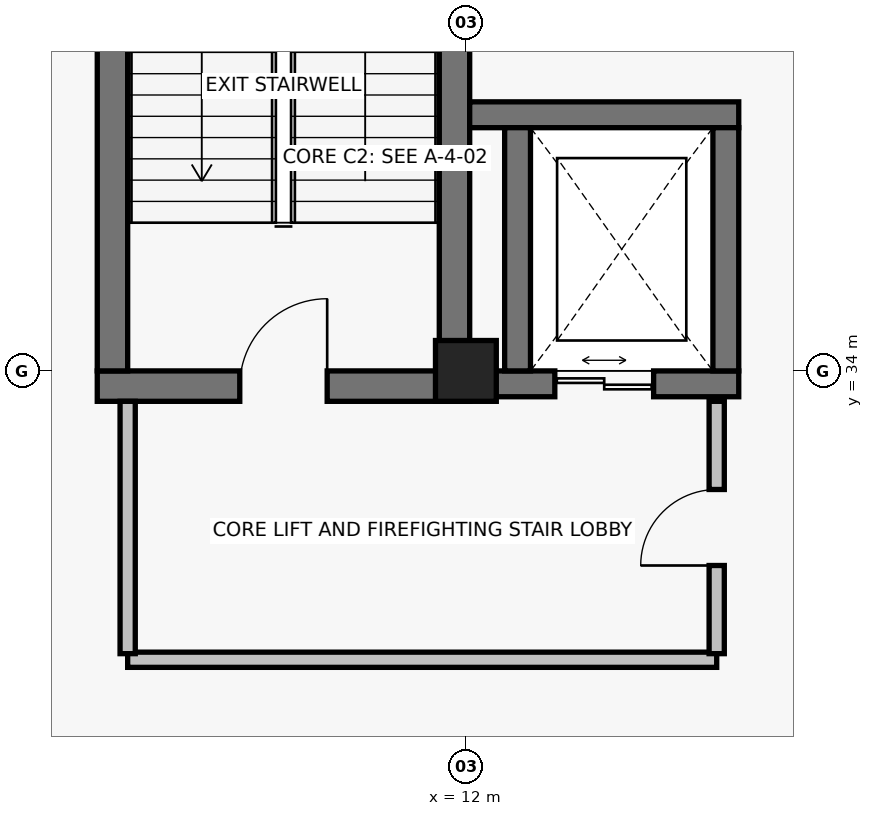
"""IFC4 building model, lengths in metres.
Left out: names, types, materials, properties, quantities, classifications, styles, units other than length and angle.
Written with IfcOpenShell. Run it as: python <this file> out.ifc"""

import sys

from ifc_helpers import new_model, si_unit, direction, frame, frame_2d, origin, origin_2d, place, context, subcontext, project, spatial, rectangle, extrude, element, fill, save


model = new_model("IFC4")
c1 = context("Model", 3, precision=1e-05, world=origin(), true_north=direction((0.0, 1.0)))
c2 = subcontext(c1, "Body", "Model", "MODEL_VIEW")
j1 = project(units=[si_unit("LENGTHUNIT", "METRE"), si_unit("PLANEANGLEUNIT", "RADIAN")], contexts=[c1])
p1 = place(None, origin())
s1 = spatial("IfcSite", under=j1, at=p1, CompositionType="ELEMENT")
p2 = place(p1, origin())
s2 = spatial("IfcBuilding", under=s1, at=p2, CompositionType="ELEMENT")
p3 = place(p2, frame((0.0, 0.0, -4.8)))
s3 = spatial("IfcBuildingStorey", under=s2, at=p3, CompositionType="ELEMENT", Elevation=-4.8)
p4 = place(p3, frame((12.0, 34.0, 0.0), z_axis=(0.0, 0.0, 1.0), x_axis=(1.0, 0.0, 0.0)))
e1 = element("IfcColumn", 1, at=p4, inside=s3, PredefinedType="COLUMN", context=c2, shape_type="SweptSolid", body=[
    extrude(rectangle(XDim=0.8, YDim=0.8, at=origin_2d()), origin(), (0.0, 0.0, 1.0), 4.8),
])
p5 = place(p3, frame((7.15, 33.8, 0.0), z_axis=(0.0, 0.0, 1.0), x_axis=(1.0, 0.0, 0.0)))
e2 = element("IfcWall", 2, at=p5, inside=s3, PredefinedType="SHEAR", context=c2, shape_type="SweptSolid", body=[
    extrude(rectangle(XDim=4.9, YDim=0.4, at=frame_2d((2.45, 0.0))), origin(), (0.0, 0.0, 1.0), 4.4),
])
p6 = place(p5, frame((1.875, 0.0, 0.0)))
e3 = element("IfcOpeningElement", 3, at=p6, cuts=e2, PredefinedType="OPENING", context=c2, shape_type="SweptSolid", body=[
    extrude(rectangle(XDim=1.15, YDim=2.15, at=frame_2d((0.575, 1.075))), frame((0.0, 0.215, 0.0), z_axis=(0.0, -1.0, 0.0), x_axis=(1.0, 0.0, 0.0)), (0.0, 0.0, 1.0), 0.43),
])
for number, where, z_axis, x_axis in (
    (4, (7.35, 43.4, 0.0), (0.0, 0.0, 1.0), (0.0, -1.0, 0.0)),
    (5, (11.85, 34.0, 0.0), (0.0, 0.0, 1.0), (0.0, 1.0, 0.0)),
):
    element("IfcWall", number, at=place(p3, frame(where, z_axis=z_axis, x_axis=x_axis)), inside=s3, PredefinedType="SHEAR", context=c2, shape_type="SweptSolid", body=[
        extrude(rectangle(XDim=9.4, YDim=0.4, at=frame_2d((4.7, 0.0))), origin(), (0.0, 0.0, 1.0), 4.4),
    ])
p7 = place(p3, frame((12.05, 33.83, 0.0), z_axis=(0.0, 0.0, 1.0), x_axis=(1.0, 0.0, 0.0)))
e6 = element("IfcWall", 6, at=p7, inside=s3, PredefinedType="SHEAR", context=c2, shape_type="SweptSolid", body=[
    extrude(rectangle(XDim=3.54, YDim=0.34, at=frame_2d((1.77, 0.0))), origin(), (0.0, 0.0, 1.0), 4.4),
])
p8 = place(p7, frame((1.12, 0.0, 0.0)))
e7 = element("IfcOpeningElement", 7, at=p8, cuts=e6, PredefinedType="OPENING", context=c2, shape_type="SweptSolid", body=[
    extrude(rectangle(XDim=1.3, YDim=2.25, at=frame_2d((0.65, 1.125))), frame((0.0, 0.185, 0.0), z_axis=(0.0, -1.0, 0.0), x_axis=(1.0, 0.0, 0.0)), (0.0, 0.0, 1.0), 0.37),
])
p9 = place(p3, frame((15.59, 37.37, 0.0), z_axis=(0.0, 0.0, 1.0), x_axis=(-1.0, 0.0, 0.0)))
e8 = element("IfcWall", 8, at=p9, inside=s3, PredefinedType="SHEAR", context=c2, shape_type="SweptSolid", body=[
    extrude(rectangle(XDim=3.54, YDim=0.34, at=frame_2d((1.77, 0.0))), origin(), (0.0, 0.0, 1.0), 4.4),
])
for number, where, z_axis, x_axis in (
    (9, (12.68, 37.2, 0.0), (0.0, 0.0, 1.0), (0.0, -1.0, 0.0)),
    (10, (15.42, 34.0, 0.0), (0.0, 0.0, 1.0), (0.0, 1.0, 0.0)),
):
    element("IfcWall", number, at=place(p3, frame(where, z_axis=z_axis, x_axis=x_axis)), inside=s3, PredefinedType="SHEAR", context=c2, shape_type="SweptSolid", body=[
        extrude(rectangle(XDim=3.2, YDim=0.34, at=frame_2d((1.6, 0.0))), origin(), (0.0, 0.0, 1.0), 4.4),
    ])
p10 = place(p3, frame((7.55, 30.2, 0.0), z_axis=(0.0, 0.0, 1.0), x_axis=(1.0, 0.0, 0.0)))
e11 = element("IfcWall", 11, at=p10, inside=s3, PredefinedType="PARTITIONING", context=c2, shape_type="SweptSolid", body=[
    extrude(rectangle(XDim=7.75, YDim=0.2, at=frame_2d((3.875, 0.0))), origin(), (0.0, 0.0, 1.0), 3.87),
])
p11 = place(p3, frame((7.55, 33.6, 0.0), z_axis=(0.0, 0.0, 1.0), x_axis=(0.0, -1.0, 0.0)))
e12 = element("IfcWall", 12, at=p11, inside=s3, PredefinedType="PARTITIONING", context=c2, shape_type="SweptSolid", body=[
    extrude(rectangle(XDim=3.32, YDim=0.2, at=frame_2d((1.66, 0.0))), origin(), (0.0, 0.0, 1.0), 4.4),
])
p12 = place(p3, frame((15.3, 30.28, 0.0), z_axis=(0.0, 0.0, 1.0), x_axis=(0.0, 1.0, 0.0)))
e13 = element("IfcWall", 13, at=p12, inside=s3, PredefinedType="PARTITIONING", context=c2, shape_type="SweptSolid", body=[
    extrude(rectangle(XDim=3.32, YDim=0.2, at=frame_2d((1.66, 0.0))), origin(), (0.0, 0.0, 1.0), 4.4),
])
p13 = place(p12, frame((1.16, 0.0, 0.0)))
e14 = element("IfcOpeningElement", 14, at=p13, cuts=e13, PredefinedType="OPENING", context=c2, shape_type="SweptSolid", body=[
    extrude(rectangle(XDim=1.0, YDim=2.15, at=frame_2d((0.5, 1.075))), frame((0.0, 0.115, 0.0), z_axis=(0.0, -1.0, 0.0), x_axis=(1.0, 0.0, 0.0)), (0.0, 0.0, 1.0), 0.23),
])
p14 = place(p6, origin())
e15 = element("IfcDoor", 15, at=p14, inside=s3, OperationType="SINGLE_SWING_RIGHT", PredefinedType="DOOR", context=c2, shape_type="SweptSolid", body=[
    extrude(rectangle(XDim=1.15, YDim=2.15, at=frame_2d((0.575, 1.075))), frame((0.0, 0.025, 0.0), z_axis=(0.0, -1.0, 0.0), x_axis=(1.0, 0.0, 0.0)), (0.0, 0.0, 1.0), 0.05),
])
fill(e3, e15)
p15 = place(p8, origin())
e16 = element("IfcDoor", 16, at=p15, inside=s3, OperationType="DOUBLE_DOOR_SLIDING", PredefinedType="DOOR", context=c2, shape_type="SweptSolid", body=[
    extrude(rectangle(XDim=1.3, YDim=2.25, at=frame_2d((0.65, 1.125))), frame((0.0, 0.025, 0.0), z_axis=(0.0, -1.0, 0.0), x_axis=(1.0, 0.0, 0.0)), (0.0, 0.0, 1.0), 0.05),
])
fill(e7, e16)
p16 = place(p13, origin())
e17 = element("IfcDoor", 17, at=p16, inside=s3, OperationType="SINGLE_SWING_LEFT", PredefinedType="DOOR", context=c2, shape_type="SweptSolid", body=[
    extrude(rectangle(XDim=1.0, YDim=2.15, at=frame_2d((0.5, 1.075))), frame((0.0, 0.025, 0.0), z_axis=(0.0, -1.0, 0.0), x_axis=(1.0, 0.0, 0.0)), (0.0, 0.0, 1.0), 0.05),
])
fill(e14, e17)
save(model, sys.argv[1])
